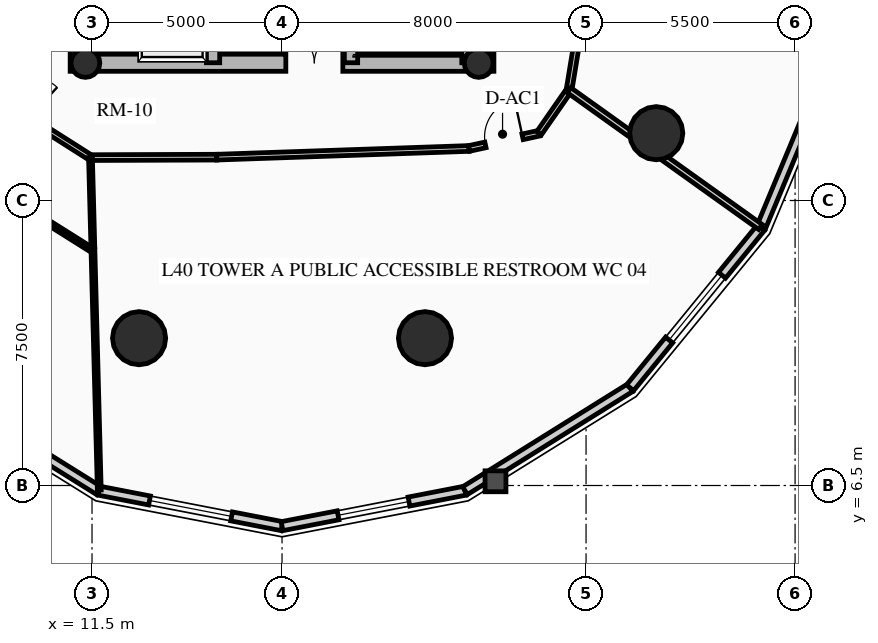
"""IFC4 building model, lengths in metres.
Left out: names, types, materials, properties, quantities, classifications, styles, units other than length and angle.
Written with IfcOpenShell. Run it as: python <this file> out.ifc"""

import sys

from ifc_helpers import new_model, si_unit, direction, frame, frame_2d, origin, origin_2d, place, context, subcontext, project, spatial, rectangle, circle, hollow_circle, extrude, source, transform, mapped, element, fill, save


model = new_model("IFC4")
c1 = context("Model", 3, precision=1e-05, world=origin(), true_north=direction((0.0, 1.0)))
c2 = subcontext(c1, "Body", "Model", "MODEL_VIEW")
j1 = project(units=[si_unit("LENGTHUNIT", "METRE"), si_unit("PLANEANGLEUNIT", "RADIAN")], contexts=[c1])
p1 = place(None, origin())
s1 = spatial("IfcSite", under=j1, at=p1, CompositionType="ELEMENT")
p2 = place(p1, origin())
s2 = spatial("IfcBuilding", under=s1, at=p2, CompositionType="ELEMENT")
p3 = place(p2, frame((0.0, 0.0, 125.44)))
s3 = spatial("IfcBuildingStorey", under=s2, at=p3, CompositionType="ELEMENT", Elevation=125.44)
for number, where, z_axis, x_axis in (
    (1, (11.15, 17.4, 0.0), (0.0, 0.0, 1.0), (0.0, 1.0, 0.0)),
    (2, (21.85, 17.4, 0.0), (0.0, 0.0, 1.0), (0.0, 1.0, 0.0)),
):
    element("IfcWall", number, at=place(p3, frame(where, z_axis=z_axis, x_axis=x_axis)), inside=s3, PredefinedType="SHEAR", context=c2, shape_type="SweptSolid", body=[
        extrude(rectangle(XDim=14.2, YDim=0.45, at=frame_2d((7.1, 0.0))), origin(), (0.0, 0.0, 1.0), 3.72),
    ])
p4 = place(p3, frame((11.15, 17.625, 0.0), z_axis=(0.0, 0.0, 1.0), x_axis=(1.0, 0.0, 0.0)))
e3 = element("IfcWall", 3, at=p4, inside=s3, PredefinedType="SHEAR", context=c2, shape_type="SweptSolid", body=[
    extrude(rectangle(XDim=10.7, YDim=0.45, at=frame_2d((5.35, 0.0))), origin(), (0.0, 0.0, 1.0), 3.72),
])
m1 = source(origin(), c2, "Body", "SweptSolid", [
    extrude(rectangle(XDim=1.5, YDim=2.02, at=frame_2d((0.75, 1.01))), frame((0.0, 0.235, 0.0), z_axis=(0.0, -1.0, 0.0), x_axis=(1.0, 0.0, 0.0)), (0.0, 0.0, 1.0), 0.47),
])
p5 = place(p4, frame((5.45, 0.0, 0.0)))
e4 = element("IfcOpeningElement", 4, at=p5, cuts=e3, PredefinedType="OPENING", context=c2, shape_type="MappedRepresentation", body=[
    mapped(m1, transform((0.0, 0.0, 0.0), x_axis=(1.0, 0.0, 0.0), y_axis=(0.0, 1.0, 0.0), z_axis=(0.0, 0.0, 1.0), scale=1.0)),
])
p6 = place(p3, frame((14.685, 17.625, 0.0), z_axis=(0.0, 0.0, 1.0), x_axis=(0.0, 1.0, 0.0)))
e5 = element("IfcWall", 5, at=p6, inside=s3, PredefinedType="SHEAR", context=c2, shape_type="SweptSolid", body=[
    extrude(rectangle(XDim=13.75, YDim=0.35, at=frame_2d((6.875, 0.0))), origin(), (0.0, 0.0, 1.0), 3.72),
])
m2 = source(origin(), c2, "Body", "SweptSolid", [
    extrude(rectangle(XDim=1.1, YDim=2.015, at=frame_2d((0.55, 1.007))), frame((0.0, 0.185, 0.0), z_axis=(0.0, -1.0, 0.0), x_axis=(1.0, 0.0, 0.0)), (0.0, 0.0, 1.0), 0.37),
])
p7 = place(p6, frame((4.875, 0.0, 0.0)))
e6 = element("IfcOpeningElement", 6, at=p7, cuts=e5, PredefinedType="OPENING", context=c2, shape_type="MappedRepresentation", body=[
    mapped(m2, transform((0.0, 0.0, 0.0), x_axis=(1.0, 0.0, 0.0), y_axis=(0.0, 1.0, 0.0), z_axis=(0.0, 0.0, 1.0), scale=1.0)),
])
p8 = place(p6, frame((0.65, 0.0, 0.0)))
e7 = element("IfcOpeningElement", 7, at=p8, cuts=e5, PredefinedType="OPENING", context=c2, shape_type="MappedRepresentation", body=[
    mapped(m2, transform((0.0, 0.0, 0.0), x_axis=(1.0, 0.0, 0.0), y_axis=(0.0, 1.0, 0.0), z_axis=(0.0, 0.0, 1.0), scale=1.0)),
])
p9 = place(p6, frame((2.65, 0.0, 0.0)))
e8 = element("IfcOpeningElement", 8, at=p9, cuts=e5, PredefinedType="OPENING", context=c2, shape_type="MappedRepresentation", body=[
    mapped(m2, transform((0.0, 0.0, 0.0), x_axis=(1.0, 0.0, 0.0), y_axis=(0.0, 1.0, 0.0), z_axis=(0.0, 0.0, 1.0), scale=1.0)),
])
m3 = source(origin(), c2, "Body", "SweptSolid", [
    extrude(rectangle(XDim=1.15, YDim=2.02, at=frame_2d((0.575, 1.01))), frame((0.0, 0.185, 0.0), z_axis=(0.0, -1.0, 0.0), x_axis=(1.0, 0.0, 0.0)), (0.0, 0.0, 1.0), 0.37),
])
p10 = place(p6, frame((7.295, 0.0, 0.0)))
e9 = element("IfcOpeningElement", 9, at=p10, cuts=e5, PredefinedType="OPENING", context=c2, shape_type="MappedRepresentation", body=[
    mapped(m3, transform((0.0, 0.0, 0.0), x_axis=(1.0, 0.0, 0.0), y_axis=(0.0, 1.0, 0.0), z_axis=(0.0, 0.0, 1.0), scale=1.0)),
])
p11 = place(p3, frame((18.315, 17.625, 0.0), z_axis=(0.0, 0.0, 1.0), x_axis=(0.0, 1.0, 0.0)))
e10 = element("IfcWall", 10, at=p11, inside=s3, PredefinedType="SHEAR", context=c2, shape_type="SweptSolid", body=[
    extrude(rectangle(XDim=13.75, YDim=0.35, at=frame_2d((6.875, 0.0))), origin(), (0.0, 0.0, 1.0), 3.72),
])
p12 = place(p11, frame((10.0, 0.0, 0.0)))
e11 = element("IfcOpeningElement", 11, at=p12, cuts=e10, PredefinedType="OPENING", context=c2, shape_type="MappedRepresentation", body=[
    mapped(m2, transform((0.0, 0.0, 0.0), x_axis=(1.0, 0.0, 0.0), y_axis=(0.0, 1.0, 0.0), z_axis=(0.0, 0.0, 1.0), scale=1.0)),
])
p13 = place(p11, frame((12.0, 0.0, 0.0)))
e12 = element("IfcOpeningElement", 12, at=p13, cuts=e10, PredefinedType="OPENING", context=c2, shape_type="MappedRepresentation", body=[
    mapped(m2, transform((0.0, 0.0, 0.0), x_axis=(1.0, 0.0, 0.0), y_axis=(0.0, 1.0, 0.0), z_axis=(0.0, 0.0, 1.0), scale=1.0)),
])
p14 = place(p11, frame((5.305, 0.0, 0.0)))
e13 = element("IfcOpeningElement", 13, at=p14, cuts=e10, PredefinedType="OPENING", context=c2, shape_type="MappedRepresentation", body=[
    mapped(m3, transform((0.0, 0.0, 0.0), x_axis=(1.0, 0.0, 0.0), y_axis=(0.0, 1.0, 0.0), z_axis=(0.0, 0.0, 1.0), scale=1.0)),
])
p15 = place(p3, frame((21.405, 17.625, 0.0), z_axis=(0.0, 0.0, 1.0), x_axis=(0.0, 1.0, 0.0)))
e14 = element("IfcWall", 14, at=p15, inside=s3, PredefinedType="SHEAR", context=c2, shape_type="SweptSolid", body=[
    extrude(rectangle(XDim=6.72, YDim=0.35, at=frame_2d((3.36, 0.0))), origin(), (0.0, 0.0, 1.0), 3.72),
])
for number, where, z_axis, x_axis in (
    (15, (11.325, 17.62, 0.0), (0.0, 0.0, 1.0), (1.0, 0.0, 0.0)),
    (16, (21.675, 17.62, 0.0), (0.0, 0.0, 1.0), (1.0, 0.0, 0.0)),
):
    element("IfcColumn", number, at=place(p3, frame(where, z_axis=z_axis, x_axis=x_axis)), inside=s3, PredefinedType="COLUMN", context=c2, shape_type="SweptSolid", body=[
        extrude(hollow_circle(Radius=0.38, WallThickness=0.032, at=origin_2d()), origin(), (0.0, 0.0, 1.0), 3.72),
    ])
for number, where, z_axis, x_axis in (
    (17, (12.739, 10.377, 0.0), (0.0, 0.0, 1.0), (1.0, 0.0, 0.0)),
    (18, (20.261, 10.377, 0.0), (0.0, 0.0, 1.0), (1.0, 0.0, 0.0)),
    (19, (26.347, 15.771, 0.0), (0.0, 0.0, 1.0), (1.0, 0.0, 0.0)),
):
    element("IfcColumn", number, at=place(p3, frame(where, z_axis=z_axis, x_axis=x_axis)), inside=s3, PredefinedType="USERDEFINED", context=c2, shape_type="SweptSolid", body=[
        extrude(circle(Radius=0.7, at=origin_2d()), origin(), (0.0, 0.0, 1.0), 3.72),
    ])
p16 = place(p3, frame((11.685, 6.363, 0.0), z_axis=(0.0, 0.0, 1.0), x_axis=(-0.848520380187, 0.529162701263, 0.0)))
e20 = element("IfcWall", 20, at=p16, inside=s3, PredefinedType="SOLIDWALL", context=c2, shape_type="SweptSolid", body=[
    extrude(rectangle(XDim=5.119, YDim=0.24, at=frame_2d((2.56, 0.0))), origin(), (0.0, 0.0, 1.0), 2.949),
])
m4 = source(origin(), c2, "Body", "SweptSolid", [
    extrude(rectangle(XDim=1.9, YDim=1.35, at=frame_2d((0.95, 0.675))), frame((0.0, 0.13, 0.0), z_axis=(0.0, -1.0, 0.0), x_axis=(1.0, 0.0, 0.0)), (0.0, 0.0, 1.0), 0.26),
])
p17 = place(p16, frame((1.609, 0.0, 0.65)))
e21 = element("IfcOpeningElement", 21, at=p17, cuts=e20, PredefinedType="OPENING", context=c2, shape_type="MappedRepresentation", body=[
    mapped(m4, transform((0.0, 0.0, 0.0), x_axis=(1.0, 0.0, 0.0), y_axis=(0.0, 1.0, 0.0), z_axis=(0.0, 0.0, 1.0), scale=1.0)),
])
p18 = place(p3, frame((16.5, 5.43, 0.0), z_axis=(0.0, 0.0, 1.0), x_axis=(-0.981723785992, 0.190311344954, 0.0)))
e22 = element("IfcWall", 22, at=p18, inside=s3, PredefinedType="SOLIDWALL", context=c2, shape_type="SweptSolid", body=[
    extrude(rectangle(XDim=4.904, YDim=0.24, at=frame_2d((2.452, 0.0))), origin(), (0.0, 0.0, 1.0), 2.949),
])
m5 = source(origin(), c2, "Body", "SweptSolid", [
    extrude(rectangle(XDim=2.2, YDim=1.35, at=frame_2d((1.1, 0.675))), frame((0.0, 0.13, 0.0), z_axis=(0.0, -1.0, 0.0), x_axis=(1.0, 0.0, 0.0)), (0.0, 0.0, 1.0), 0.26),
])
p19 = place(p18, frame((1.352, 0.0, 0.65)))
e23 = element("IfcOpeningElement", 23, at=p19, cuts=e22, PredefinedType="OPENING", context=c2, shape_type="MappedRepresentation", body=[
    mapped(m5, transform((0.0, 0.0, 0.0), x_axis=(1.0, 0.0, 0.0), y_axis=(0.0, 1.0, 0.0), z_axis=(0.0, 0.0, 1.0), scale=1.0)),
])
p20 = place(p3, frame((21.315, 6.363, 0.0), z_axis=(0.0, 0.0, 1.0), x_axis=(-0.981723785992, -0.190311344954, 0.0)))
e24 = element("IfcWall", 24, at=p20, inside=s3, PredefinedType="SOLIDWALL", context=c2, shape_type="SweptSolid", body=[
    extrude(rectangle(XDim=4.904, YDim=0.24, at=frame_2d((2.452, 0.0))), origin(), (0.0, 0.0, 1.0), 2.949),
])
p21 = place(p20, frame((1.502, 0.0, 0.65)))
e25 = element("IfcOpeningElement", 25, at=p21, cuts=e24, PredefinedType="OPENING", context=c2, shape_type="MappedRepresentation", body=[
    mapped(m4, transform((0.0, 0.0, 0.0), x_axis=(1.0, 0.0, 0.0), y_axis=(0.0, 1.0, 0.0), z_axis=(0.0, 0.0, 1.0), scale=1.0)),
])
p22 = place(p3, frame((25.658, 9.072, 0.0), z_axis=(0.0, 0.0, 1.0), x_axis=(-0.848520380187, -0.529162701263, 0.0)))
e26 = element("IfcWall", 26, at=p22, inside=s3, PredefinedType="SOLIDWALL", context=c2, shape_type="SweptSolid", body=[
    extrude(rectangle(XDim=5.119, YDim=0.24, at=frame_2d((2.56, 0.0))), origin(), (0.0, 0.0, 1.0), 2.949),
])
p23 = place(p3, frame((29.105, 13.291, 0.0), z_axis=(0.0, 0.0, 1.0), x_axis=(-0.632700781152, -0.77439635945, 0.0)))
e27 = element("IfcWall", 27, at=p23, inside=s3, PredefinedType="SOLIDWALL", context=c2, shape_type="SweptSolid", body=[
    extrude(rectangle(XDim=5.448, YDim=0.24, at=frame_2d((2.724, 0.0))), origin(), (0.0, 0.0, 1.0), 2.949),
])
p24 = place(p23, frame((1.624, 0.0, 0.65)))
e28 = element("IfcOpeningElement", 28, at=p24, cuts=e27, PredefinedType="OPENING", context=c2, shape_type="MappedRepresentation", body=[
    mapped(m5, transform((0.0, 0.0, 0.0), x_axis=(1.0, 0.0, 0.0), y_axis=(0.0, 1.0, 0.0), z_axis=(0.0, 0.0, 1.0), scale=1.0)),
])
p25 = place(p3, frame((31.318, 18.607, 0.0), z_axis=(0.0, 0.0, 1.0), x_axis=(-0.384344417632, -0.923189779317, 0.0)))
e29 = element("IfcWall", 29, at=p25, inside=s3, PredefinedType="SOLIDWALL", context=c2, shape_type="SweptSolid", body=[
    extrude(rectangle(XDim=5.758, YDim=0.24, at=frame_2d((2.879, 0.0))), origin(), (0.0, 0.0, 1.0), 2.949),
])
p26 = place(p3, frame((10.115, 15.983, 0.0), z_axis=(0.0, 0.0, 1.0), x_axis=(0.843995849351, -0.536349705209, 0.0)))
e30 = element("IfcWall", 30, at=p26, inside=s3, PredefinedType="PARTITIONING", context=c2, shape_type="SweptSolid", body=[
    extrude(rectangle(XDim=1.593, YDim=0.15, at=frame_2d((0.796, 0.0))), origin(), (0.0, 0.0, 1.0), 2.995),
])
p27 = place(p3, frame((11.46, 15.129, 0.0), z_axis=(0.0, 0.0, 1.0), x_axis=(0.999993513287, 0.003601858435, 0.0)))
e31 = element("IfcWall", 31, at=p27, inside=s3, PredefinedType="PARTITIONING", context=c2, shape_type="SweptSolid", body=[
    extrude(rectangle(XDim=3.321, YDim=0.15, at=frame_2d((1.661, 0.0))), origin(), (0.0, 0.0, 1.0), 2.995),
])
p28 = place(p3, frame((14.781, 15.141, 0.0), z_axis=(0.0, 0.0, 1.0), x_axis=(0.999407918707, 0.034406569513, 0.0)))
e32 = element("IfcWall", 32, at=p28, inside=s3, PredefinedType="PARTITIONING", context=c2, shape_type="SweptSolid", body=[
    extrude(rectangle(XDim=6.642, YDim=0.15, at=frame_2d((3.321, 0.0))), origin(), (0.0, 0.0, 1.0), 2.995),
])
p29 = place(p3, frame((21.419, 15.369, 0.0), z_axis=(0.0, 0.0, 1.0), x_axis=(0.977192701953, 0.212354475464, 0.0)))
e33 = element("IfcWall", 33, at=p29, inside=s3, PredefinedType="PARTITIONING", context=c2, shape_type="SweptSolid", body=[
    extrude(rectangle(XDim=1.888, YDim=0.15, at=frame_2d((0.944, 0.0))), origin(), (0.0, 0.0, 1.0), 2.995),
])
m6 = source(origin(), c2, "Body", "SweptSolid", [
    extrude(rectangle(XDim=1.0, YDim=2.015, at=frame_2d((0.5, 1.007))), frame((0.0, 0.085, 0.0), z_axis=(0.0, -1.0, 0.0), x_axis=(1.0, 0.0, 0.0)), (0.0, 0.0, 1.0), 0.17),
])
p30 = place(p29, frame((0.444, 0.0, 0.0)))
e34 = element("IfcOpeningElement", 34, at=p30, cuts=e33, PredefinedType="OPENING", context=c2, shape_type="MappedRepresentation", body=[
    mapped(m6, transform((0.0, 0.0, 0.0), x_axis=(1.0, 0.0, 0.0), y_axis=(0.0, 1.0, 0.0), z_axis=(0.0, 0.0, 1.0), scale=1.0)),
])
p31 = place(p3, frame((23.263, 15.77, 0.0), z_axis=(0.0, 0.0, 1.0), x_axis=(0.570743456919, 0.821128434768, 0.0)))
e35 = element("IfcWall", 35, at=p31, inside=s3, PredefinedType="PARTITIONING", context=c2, shape_type="SweptSolid", body=[
    extrude(rectangle(XDim=1.382, YDim=0.15, at=frame_2d((0.691, 0.0))), origin(), (0.0, 0.0, 1.0), 2.995),
])
p32 = place(p3, frame((24.052, 16.905, 0.0), z_axis=(0.0, 0.0, 1.0), x_axis=(0.162091534225, 0.986775726562, 0.0)))
e36 = element("IfcWall", 36, at=p32, inside=s3, PredefinedType="PARTITIONING", context=c2, shape_type="SweptSolid", body=[
    extrude(rectangle(XDim=1.613, YDim=0.15, at=frame_2d((0.807, 0.0))), origin(), (0.0, 0.0, 1.0), 2.995),
])
p33 = place(p3, frame((11.46, 15.129, 0.0), z_axis=(0.0, 0.0, 1.0), x_axis=(0.026480592098, -0.999649327636, 0.0)))
e37 = element("IfcWall", 37, at=p33, inside=s3, PredefinedType="MOVABLE", context=c2, shape_type="SweptSolid", body=[
    extrude(rectangle(XDim=8.75, YDim=0.1, at=frame_2d((4.375, 0.0))), origin(), (0.0, 0.0, 1.0), 2.949),
])
p34 = place(p3, frame((24.052, 16.905, 0.0), z_axis=(0.0, 0.0, 1.0), x_axis=(0.813437670746, -0.581652091727, 0.0)))
e38 = element("IfcWall", 38, at=p34, inside=s3, PredefinedType="PARTITIONING", context=c2, shape_type="SweptSolid", body=[
    extrude(rectangle(XDim=6.192, YDim=0.16, at=frame_2d((3.096, 0.0))), origin(), (0.0, 0.0, 1.0), 2.949),
])
p35 = place(p3, frame((9.342, 14.052, 0.0), z_axis=(0.0, 0.0, 1.0), x_axis=(0.846526826244, -0.532346064557, 0.0)))
e39 = element("IfcWall", 39, at=p35, inside=s3, PredefinedType="PARTITIONING", context=c2, shape_type="SweptSolid", body=[
    extrude(rectangle(XDim=2.578, YDim=0.125, at=frame_2d((1.289, 0.0))), origin(), (0.0, 0.0, 1.0), 2.995),
])
m7 = source(origin(), c2, "Body", "SweptSolid", [
    extrude(rectangle(XDim=2.2, YDim=1.35, at=frame_2d((1.1, 0.675))), frame((0.0, 0.03, 0.0), z_axis=(0.0, -1.0, 0.0), x_axis=(1.0, 0.0, 0.0)), (0.0, 0.0, 1.0), 0.06),
])
p36 = place(p19, origin())
e40 = element("IfcWindow", 40, at=p36, inside=s3, PartitioningType="DOUBLE_PANEL_VERTICAL", PredefinedType="WINDOW", context=c2, shape_type="MappedRepresentation", body=[
    mapped(m7, transform((0.0, 0.0, 0.0), x_axis=(1.0, 0.0, 0.0), y_axis=(0.0, 1.0, 0.0), z_axis=(0.0, 0.0, 1.0), scale=1.0)),
])
fill(e23, e40)
m8 = source(origin(), c2, "Body", "SweptSolid", [
    extrude(rectangle(XDim=1.9, YDim=1.35, at=frame_2d((0.95, 0.675))), frame((0.0, 0.03, 0.0), z_axis=(0.0, -1.0, 0.0), x_axis=(1.0, 0.0, 0.0)), (0.0, 0.0, 1.0), 0.06),
])
p37 = place(p21, origin())
e41 = element("IfcWindow", 41, at=p37, inside=s3, PartitioningType="DOUBLE_PANEL_VERTICAL", PredefinedType="WINDOW", context=c2, shape_type="MappedRepresentation", body=[
    mapped(m8, transform((0.0, 0.0, 0.0), x_axis=(1.0, 0.0, 0.0), y_axis=(0.0, 1.0, 0.0), z_axis=(0.0, 0.0, 1.0), scale=1.0)),
])
fill(e25, e41)
p38 = place(p24, origin())
e42 = element("IfcWindow", 42, at=p38, inside=s3, PartitioningType="DOUBLE_PANEL_VERTICAL", PredefinedType="WINDOW", context=c2, shape_type="MappedRepresentation", body=[
    mapped(m7, transform((0.0, 0.0, 0.0), x_axis=(1.0, 0.0, 0.0), y_axis=(0.0, 1.0, 0.0), z_axis=(0.0, 0.0, 1.0), scale=1.0)),
])
fill(e28, e42)
m9 = source(origin(), c2, "Body", "SweptSolid", [
    extrude(rectangle(XDim=1.5, YDim=2.02, at=frame_2d((0.75, 1.01))), frame((0.0, 0.025, 0.0), z_axis=(0.0, -1.0, 0.0), x_axis=(1.0, 0.0, 0.0)), (0.0, 0.0, 1.0), 0.05),
])
p39 = place(p5, origin())
e43 = element("IfcDoor", 43, at=p39, inside=s3, OperationType="DOUBLE_DOOR_SINGLE_SWING", PredefinedType="DOOR", context=c2, shape_type="MappedRepresentation", body=[
    mapped(m9, transform((0.0, 0.0, 0.0), x_axis=(1.0, 0.0, 0.0), y_axis=(0.0, 1.0, 0.0), z_axis=(0.0, 0.0, 1.0), scale=1.0)),
])
fill(e4, e43)
m10 = source(origin(), c2, "Body", "SweptSolid", [
    extrude(rectangle(XDim=1.0, YDim=2.015, at=frame_2d((0.5, 1.007))), frame((0.0, 0.025, 0.0), z_axis=(0.0, -1.0, 0.0), x_axis=(1.0, 0.0, 0.0)), (0.0, 0.0, 1.0), 0.05),
])
p40 = place(p30, origin())
e44 = element("IfcDoor", 44, at=p40, inside=s3, OperationType="SINGLE_SWING_RIGHT", PredefinedType="DOOR", context=c2, shape_type="MappedRepresentation", body=[
    mapped(m10, transform((0.0, 0.0, 0.0), x_axis=(1.0, 0.0, 0.0), y_axis=(0.0, 1.0, 0.0), z_axis=(0.0, 0.0, 1.0), scale=1.0)),
])
fill(e34, e44)
save(model, sys.argv[1])
